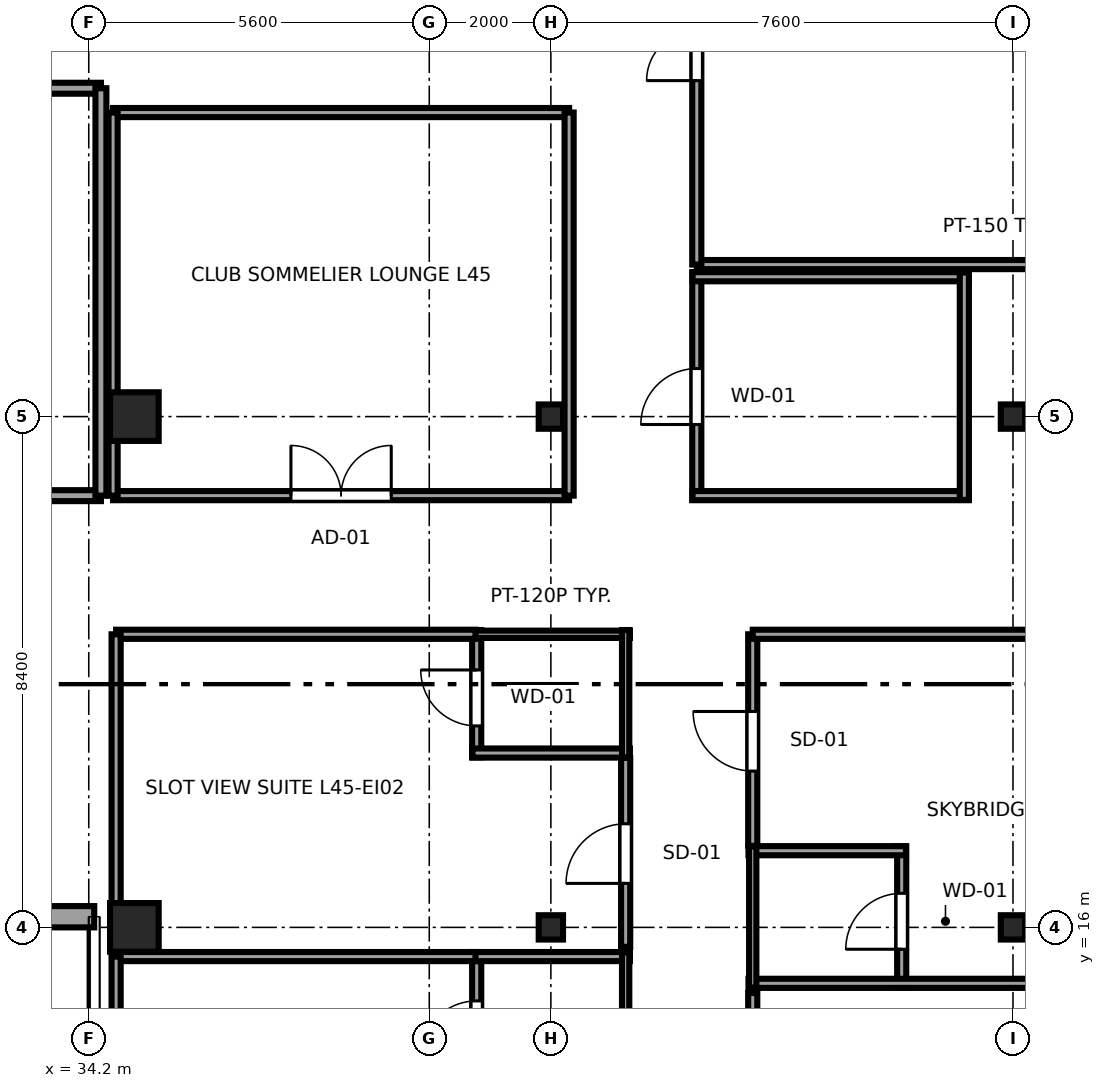
"""IFC4 building model, lengths in metres.
Left out: names, types, materials, properties, quantities, classifications, styles, units other than length and angle.
Written with IfcOpenShell. Run it as: python <this file> out.ifc"""

import sys

from ifc_helpers import new_model, si_unit, direction, frame, frame_2d, origin, origin_2d, place, context, subcontext, project, spatial, rectangle, i_section, extrude, source, transform, mapped, element, fill, save


model = new_model("IFC4")
c1 = context("Model", 3, precision=1e-05, world=origin(), true_north=direction((0.0, 1.0)))
c2 = subcontext(c1, "Body", "Model", "MODEL_VIEW")
j1 = project(units=[si_unit("LENGTHUNIT", "METRE"), si_unit("PLANEANGLEUNIT", "RADIAN")], contexts=[c1])
p1 = place(None, origin())
s1 = spatial("IfcSite", under=j1, at=p1, CompositionType="ELEMENT")
p2 = place(p1, origin())
s2 = spatial("IfcBuilding", under=s1, at=p2, CompositionType="ELEMENT")
p3 = place(p2, frame((0.0, 0.0, 171.9)))
s3 = spatial("IfcBuildingStorey", under=s2, at=p3, CompositionType="ELEMENT", Elevation=171.9)
m1 = source(origin(), c2, "Body", "SweptSolid", [
    extrude(rectangle(XDim=0.8, YDim=0.8, at=origin_2d()), origin(), (0.0, 0.0, 1.0), 3.55),
])
for number, where, z_axis, x_axis in (
    (1, (34.95, 16.0, 0.0), (0.0, 0.0, 1.0), (1.0, 0.0, 0.0)),
    (2, (34.95, 24.4, 0.0), (0.0, 0.0, 1.0), (1.0, 0.0, 0.0)),
):
    element("IfcColumn", number, at=place(p3, frame(where, z_axis=z_axis, x_axis=x_axis)), inside=s3, PredefinedType="COLUMN", context=c2, shape_type="MappedRepresentation", body=[
        mapped(m1, transform((0.0, 0.0, 0.0), x_axis=(1.0, 0.0, 0.0), y_axis=(0.0, 1.0, 0.0), z_axis=(0.0, 0.0, 1.0), scale=1.0)),
    ])
m2 = source(origin(), c2, "Body", "SweptSolid", [
    extrude(i_section(OverallWidth=0.4, OverallDepth=0.4, WebThickness=0.02, FlangeThickness=0.035, at=origin_2d()), origin(), (0.0, 0.0, 1.0), 3.55),
])
for number, where, z_axis, x_axis in (
    (3, (41.8, 16.0, 0.0), (0.0, 0.0, 1.0), (1.0, 0.0, 0.0)),
    (4, (41.8, 24.4, 0.0), (0.0, 0.0, 1.0), (1.0, 0.0, 0.0)),
    (5, (49.4, 16.0, 0.0), (0.0, 0.0, 1.0), (1.0, 0.0, 0.0)),
    (6, (49.4, 24.4, 0.0), (0.0, 0.0, 1.0), (1.0, 0.0, 0.0)),
):
    element("IfcColumn", number, at=place(p3, frame(where, z_axis=z_axis, x_axis=x_axis)), inside=s3, PredefinedType="COLUMN", context=c2, shape_type="MappedRepresentation", body=[
        mapped(m2, transform((0.0, 0.0, 0.0), x_axis=(1.0, 0.0, 0.0), y_axis=(0.0, 1.0, 0.0), z_axis=(0.0, 0.0, 1.0), scale=1.0)),
    ])
p4 = place(p3, frame((22.71, 16.175, 0.0), z_axis=(0.0, 0.0, 1.0), x_axis=(1.0, 0.0, 0.0)))
e7 = element("IfcWall", 7, at=p4, inside=s3, PredefinedType="SOLIDWALL", context=c2, shape_type="SweptSolid", body=[
    extrude(rectangle(XDim=11.58, YDim=0.35, at=frame_2d((5.79, 0.0))), origin(), (0.0, 0.0, 1.0), 2.758),
])
p5 = place(p4, frame((1.92, 0.0, 0.68)))
e8 = element("IfcOpeningElement", 8, at=p5, cuts=e7, PredefinedType="OPENING", context=c2, shape_type="SweptSolid", body=[
    extrude(rectangle(XDim=2.55, YDim=1.92, at=frame_2d((1.275, 0.96))), frame((0.0, 0.185, 0.0), z_axis=(0.0, -1.0, 0.0), x_axis=(1.0, 0.0, 0.0)), (0.0, 0.0, 1.0), 0.37),
])
p6 = place(p4, frame((7.11, 0.0, 0.68)))
e9 = element("IfcOpeningElement", 9, at=p6, cuts=e7, PredefinedType="OPENING", context=c2, shape_type="SweptSolid", body=[
    extrude(rectangle(XDim=2.55, YDim=1.92, at=frame_2d((1.275, 0.96))), frame((0.0, 0.185, 0.0), z_axis=(0.0, -1.0, 0.0), x_axis=(1.0, 0.0, 0.0)), (0.0, 0.0, 1.0), 0.37),
])
p7 = place(p3, frame((40.58, 13.212, 0.0), z_axis=(0.0, 0.0, 1.0), x_axis=(0.0, 1.0, 0.0)))
e10 = element("IfcWall", 10, at=p7, inside=s3, PredefinedType="PARTITIONING", context=c2, shape_type="SweptSolid", body=[
    extrude(rectangle(XDim=2.378, YDim=0.15, at=frame_2d((1.189, 0.0))), origin(), (0.0, 0.0, 1.0), 3.37),
])
p8 = place(p7, frame((0.659, 0.0, 0.0)))
e11 = element("IfcOpeningElement", 11, at=p8, cuts=e10, PredefinedType="OPENING", context=c2, shape_type="SweptSolid", body=[
    extrude(rectangle(XDim=0.92, YDim=2.01, at=frame_2d((0.46, 1.005))), frame((0.0, 0.085, 0.0), z_axis=(0.0, -1.0, 0.0), x_axis=(1.0, 0.0, 0.0)), (0.0, 0.0, 1.0), 0.17),
])
p9 = place(p3, frame((40.51, 15.52, 0.0), z_axis=(0.0, 0.0, 1.0), x_axis=(1.0, 0.0, 0.0)))
e12 = element("IfcWall", 12, at=p9, inside=s3, PredefinedType="PARTITIONING", context=c2, shape_type="SweptSolid", body=[
    extrude(rectangle(XDim=2.59, YDim=0.15, at=frame_2d((1.295, 0.0))), origin(), (0.0, 0.0, 1.0), 3.37),
])
p10 = place(p3, frame((43.03, 13.212, 0.0), z_axis=(0.0, 0.0, 1.0), x_axis=(0.0, 1.0, 0.0)))
e13 = element("IfcWall", 13, at=p10, inside=s3, PredefinedType="PLUMBINGWALL", context=c2, shape_type="SweptSolid", body=[
    extrude(rectangle(XDim=2.378, YDim=0.12, at=frame_2d((1.189, 0.0))), origin(), (0.0, 0.0, 1.0), 3.37),
])
p11 = place(p3, frame((40.58, 18.797, 0.0), z_axis=(0.0, 0.0, 1.0), x_axis=(0.0, 1.0, 0.0)))
e14 = element("IfcWall", 14, at=p11, inside=s3, PredefinedType="PARTITIONING", context=c2, shape_type="SweptSolid", body=[
    extrude(rectangle(XDim=2.093, YDim=0.15, at=frame_2d((1.046, 0.0))), origin(), (0.0, 0.0, 1.0), 3.37),
])
p12 = place(p11, frame((0.517, 0.0, 0.0)))
e15 = element("IfcOpeningElement", 15, at=p12, cuts=e14, PredefinedType="OPENING", context=c2, shape_type="SweptSolid", body=[
    extrude(rectangle(XDim=0.92, YDim=2.01, at=frame_2d((0.46, 1.005))), frame((0.0, 0.085, 0.0), z_axis=(0.0, -1.0, 0.0), x_axis=(1.0, 0.0, 0.0)), (0.0, 0.0, 1.0), 0.17),
])
p13 = place(p3, frame((40.51, 18.867, 0.0), z_axis=(0.0, 0.0, 1.0), x_axis=(1.0, 0.0, 0.0)))
e16 = element("IfcWall", 16, at=p13, inside=s3, PredefinedType="PARTITIONING", context=c2, shape_type="SweptSolid", body=[
    extrude(rectangle(XDim=2.59, YDim=0.15, at=frame_2d((1.295, 0.0))), origin(), (0.0, 0.0, 1.0), 3.37),
])
p14 = place(p3, frame((40.51, 20.82, 0.0), z_axis=(0.0, 0.0, 1.0), x_axis=(1.0, 0.0, 0.0)))
e17 = element("IfcWall", 17, at=p14, inside=s3, PredefinedType="PLUMBINGWALL", context=c2, shape_type="SweptSolid", body=[
    extrude(rectangle(XDim=2.59, YDim=0.12, at=frame_2d((1.295, 0.0))), origin(), (0.0, 0.0, 1.0), 3.37),
])
p15 = place(p3, frame((43.03, 18.797, 0.0), z_axis=(0.0, 0.0, 1.0), x_axis=(0.0, 1.0, 0.0)))
e18 = element("IfcWall", 18, at=p15, inside=s3, PredefinedType="PLUMBINGWALL", context=c2, shape_type="SweptSolid", body=[
    extrude(rectangle(XDim=2.093, YDim=0.12, at=frame_2d((1.046, 0.0))), origin(), (0.0, 0.0, 1.0), 3.37),
])
p16 = place(p3, frame((47.57, 15.01, 0.0), z_axis=(0.0, 0.0, 1.0), x_axis=(0.0, 1.0, 0.0)))
e19 = element("IfcWall", 19, at=p16, inside=s3, PredefinedType="PARTITIONING", context=c2, shape_type="SweptSolid", body=[
    extrude(rectangle(XDim=2.321, YDim=0.15, at=frame_2d((1.161, 0.0))), origin(), (0.0, 0.0, 1.0), 3.37),
])
p17 = place(p16, frame((0.631, 0.0, 0.0)))
e20 = element("IfcOpeningElement", 20, at=p17, cuts=e19, PredefinedType="OPENING", context=c2, shape_type="SweptSolid", body=[
    extrude(rectangle(XDim=0.92, YDim=2.01, at=frame_2d((0.46, 1.005))), frame((0.0, 0.085, 0.0), z_axis=(0.0, -1.0, 0.0), x_axis=(1.0, 0.0, 0.0)), (0.0, 0.0, 1.0), 0.17),
])
p18 = place(p3, frame((45.05, 15.08, 0.0), z_axis=(0.0, 0.0, 1.0), x_axis=(1.0, 0.0, 0.0)))
e21 = element("IfcWall", 21, at=p18, inside=s3, PredefinedType="PARTITIONING", context=c2, shape_type="SweptSolid", body=[
    extrude(rectangle(XDim=9.05, YDim=0.15, at=frame_2d((4.525, 0.0))), origin(), (0.0, 0.0, 1.0), 3.37),
])
p19 = place(p3, frame((45.05, 17.261, 0.0), z_axis=(0.0, 0.0, 1.0), x_axis=(1.0, 0.0, 0.0)))
e22 = element("IfcWall", 22, at=p19, inside=s3, PredefinedType="PARTITIONING", context=c2, shape_type="SweptSolid", body=[
    extrude(rectangle(XDim=2.59, YDim=0.15, at=frame_2d((1.295, 0.0))), origin(), (0.0, 0.0, 1.0), 3.37),
])
p20 = place(p3, frame((45.12, 15.01, 0.0), z_axis=(0.0, 0.0, 1.0), x_axis=(0.0, 1.0, 0.0)))
e23 = element("IfcWall", 23, at=p20, inside=s3, PredefinedType="PLUMBINGWALL", context=c2, shape_type="SweptSolid", body=[
    extrude(rectangle(XDim=2.321, YDim=0.12, at=frame_2d((1.161, 0.0))), origin(), (0.0, 0.0, 1.0), 3.37),
])
p21 = place(p3, frame((34.65, 15.52, 0.0), z_axis=(0.0, 0.0, 1.0), x_axis=(1.0, 0.0, 0.0)))
e24 = element("IfcWall", 24, at=p21, inside=s3, PredefinedType="PARTITIONING", context=c2, shape_type="SweptSolid", body=[
    extrude(rectangle(XDim=5.91, YDim=0.15, at=frame_2d((2.955, 0.0))), origin(), (0.0, 0.0, 1.0), 3.37),
])
p22 = place(p3, frame((34.65, 9.63, 0.0), z_axis=(0.0, 0.0, 1.0), x_axis=(0.0, 1.0, 0.0)))
e25 = element("IfcWall", 25, at=p22, inside=s3, PredefinedType="PARTITIONING", context=c2, shape_type="SweptSolid", body=[
    extrude(rectangle(XDim=5.89, YDim=0.15, at=frame_2d((2.945, 0.0))), origin(), (0.0, 0.0, 1.0), 3.37),
])
p23 = place(p3, frame((43.03, 15.68, 0.0), z_axis=(0.0, 0.0, 1.0), x_axis=(0.0, 1.0, 0.0)))
e26 = element("IfcWall", 26, at=p23, inside=s3, PredefinedType="PARTITIONING", context=c2, shape_type="SweptSolid", body=[
    extrude(rectangle(XDim=3.107, YDim=0.15, at=frame_2d((1.554, 0.0))), origin(), (0.0, 0.0, 1.0), 3.37),
])
p24 = place(p23, frame((1.043, 0.0, 0.0)))
e27 = element("IfcOpeningElement", 27, at=p24, cuts=e26, PredefinedType="OPENING", context=c2, shape_type="SweptSolid", body=[
    extrude(rectangle(XDim=0.98, YDim=2.12, at=frame_2d((0.49, 1.06))), frame((0.0, 0.085, 0.0), z_axis=(0.0, -1.0, 0.0), x_axis=(1.0, 0.0, 0.0)), (0.0, 0.0, 1.0), 0.17),
])
p25 = place(p3, frame((34.65, 20.82, 0.0), z_axis=(0.0, 0.0, 1.0), x_axis=(1.0, 0.0, 0.0)))
e28 = element("IfcWall", 28, at=p25, inside=s3, PredefinedType="PARTITIONING", context=c2, shape_type="SweptSolid", body=[
    extrude(rectangle(XDim=5.91, YDim=0.15, at=frame_2d((2.955, 0.0))), origin(), (0.0, 0.0, 1.0), 3.37),
])
p26 = place(p3, frame((34.65, 15.68, 0.0), z_axis=(0.0, 0.0, 1.0), x_axis=(0.0, 1.0, 0.0)))
e29 = element("IfcWall", 29, at=p26, inside=s3, PredefinedType="PARTITIONING", context=c2, shape_type="SweptSolid", body=[
    extrude(rectangle(XDim=5.14, YDim=0.15, at=frame_2d((2.57, 0.0))), origin(), (0.0, 0.0, 1.0), 3.37),
])
p27 = place(p3, frame((45.12, 11.379, 0.0), z_axis=(0.0, 0.0, 1.0), x_axis=(0.0, 1.0, 0.0)))
e30 = element("IfcWall", 30, at=p27, inside=s3, PredefinedType="PARTITIONING", context=c2, shape_type="SweptSolid", body=[
    extrude(rectangle(XDim=3.541, YDim=0.15, at=frame_2d((1.771, 0.0))), origin(), (0.0, 0.0, 1.0), 3.37),
])
p28 = place(p27, frame((1.26, 0.0, 0.0)))
e31 = element("IfcOpeningElement", 31, at=p28, cuts=e30, PredefinedType="OPENING", context=c2, shape_type="SweptSolid", body=[
    extrude(rectangle(XDim=0.98, YDim=2.12, at=frame_2d((0.49, 1.06))), frame((0.0, 0.085, 0.0), z_axis=(0.0, -1.0, 0.0), x_axis=(1.0, 0.0, 0.0)), (0.0, 0.0, 1.0), 0.17),
])
p29 = place(p3, frame((45.12, 17.341, 0.0), z_axis=(0.0, 0.0, 1.0), x_axis=(0.0, 1.0, 0.0)))
e32 = element("IfcWall", 32, at=p29, inside=s3, PredefinedType="PARTITIONING", context=c2, shape_type="SweptSolid", body=[
    extrude(rectangle(XDim=3.479, YDim=0.15, at=frame_2d((1.74, 0.0))), origin(), (0.0, 0.0, 1.0), 3.37),
])
p30 = place(p29, frame((1.229, 0.0, 0.0)))
e33 = element("IfcOpeningElement", 33, at=p30, cuts=e32, PredefinedType="OPENING", context=c2, shape_type="SweptSolid", body=[
    extrude(rectangle(XDim=0.98, YDim=2.12, at=frame_2d((0.49, 1.06))), frame((0.0, 0.085, 0.0), z_axis=(0.0, -1.0, 0.0), x_axis=(1.0, 0.0, 0.0)), (0.0, 0.0, 1.0), 0.17),
])
p31 = place(p3, frame((45.12, 20.82, 0.0), z_axis=(0.0, 0.0, 1.0), x_axis=(1.0, 0.0, 0.0)))
e34 = element("IfcWall", 34, at=p31, inside=s3, PredefinedType="PARTITIONING", context=c2, shape_type="SweptSolid", body=[
    extrude(rectangle(XDim=8.98, YDim=0.15, at=frame_2d((4.49, 0.0))), origin(), (0.0, 0.0, 1.0), 3.37),
])
p32 = place(p3, frame((44.2, 23.03, 0.0), z_axis=(0.0, 0.0, 1.0), x_axis=(0.0, 1.0, 0.0)))
e35 = element("IfcWall", 35, at=p32, inside=s3, PredefinedType="PARTITIONING", context=c2, shape_type="SweptSolid", body=[
    extrude(rectangle(XDim=3.74, YDim=0.15, at=frame_2d((1.87, 0.0))), origin(), (0.0, 0.0, 1.0), 3.37),
])
p33 = place(p32, frame((1.24, 0.0, 0.0)))
e36 = element("IfcOpeningElement", 36, at=p33, cuts=e35, PredefinedType="OPENING", context=c2, shape_type="SweptSolid", body=[
    extrude(rectangle(XDim=0.92, YDim=2.01, at=frame_2d((0.46, 1.005))), frame((0.0, 0.085, 0.0), z_axis=(0.0, -1.0, 0.0), x_axis=(1.0, 0.0, 0.0)), (0.0, 0.0, 1.0), 0.17),
])
for number, where, z_axis, x_axis in (
    (37, (44.13, 23.1, 0.0), (0.0, 0.0, 1.0), (1.0, 0.0, 0.0)),
    (38, (44.13, 26.7, 0.0), (0.0, 0.0, 1.0), (1.0, 0.0, 0.0)),
):
    element("IfcWall", number, at=place(p3, frame(where, z_axis=z_axis, x_axis=x_axis)), inside=s3, PredefinedType="PARTITIONING", context=c2, shape_type="SweptSolid", body=[
        extrude(rectangle(XDim=4.54, YDim=0.15, at=frame_2d((2.27, 0.0))), origin(), (0.0, 0.0, 1.0), 3.37),
    ])
p34 = place(p3, frame((48.6, 23.03, 0.0), z_axis=(0.0, 0.0, 1.0), x_axis=(0.0, 1.0, 0.0)))
e39 = element("IfcWall", 39, at=p34, inside=s3, PredefinedType="PARTITIONING", context=c2, shape_type="SweptSolid", body=[
    extrude(rectangle(XDim=3.74, YDim=0.15, at=frame_2d((1.87, 0.0))), origin(), (0.0, 0.0, 1.0), 3.37),
])
p35 = place(p3, frame((44.2, 26.9, 0.0), z_axis=(0.0, 0.0, 1.0), x_axis=(1.0, 0.0, 0.0)))
e40 = element("IfcWall", 40, at=p35, inside=s3, PredefinedType="PARTITIONING", context=c2, shape_type="SweptSolid", body=[
    extrude(rectangle(XDim=9.9, YDim=0.15, at=frame_2d((4.95, 0.0))), origin(), (0.0, 0.0, 1.0), 3.37),
])
p36 = place(p3, frame((44.2, 26.9, 0.0), z_axis=(0.0, 0.0, 1.0), x_axis=(0.0, 1.0, 0.0)))
e41 = element("IfcWall", 41, at=p36, inside=s3, PredefinedType="PARTITIONING", context=c2, shape_type="SweptSolid", body=[
    extrude(rectangle(XDim=7.7, YDim=0.15, at=frame_2d((3.85, 0.0))), origin(), (0.0, 0.0, 1.0), 3.37),
])
p37 = place(p36, frame((3.025, 0.0, 0.0)))
e42 = element("IfcOpeningElement", 42, at=p37, cuts=e41, PredefinedType="OPENING", context=c2, shape_type="SweptSolid", body=[
    extrude(rectangle(XDim=1.65, YDim=2.15, at=frame_2d((0.825, 1.075))), frame((0.0, 0.085, 0.0), z_axis=(0.0, -1.0, 0.0), x_axis=(1.0, 0.0, 0.0)), (0.0, 0.0, 1.0), 0.17),
])
p38 = place(p3, frame((27.1, 23.1, 0.0), z_axis=(0.0, 0.0, 1.0), x_axis=(1.0, 0.0, 0.0)))
e43 = element("IfcWall", 43, at=p38, inside=s3, PredefinedType="PARTITIONING", context=c2, shape_type="SweptSolid", body=[
    extrude(rectangle(XDim=7.3, YDim=0.18, at=frame_2d((3.65, 0.0))), origin(), (0.0, 0.0, 1.0), 3.37),
])
p39 = place(p38, frame((2.825, 0.0, 0.0)))
e44 = element("IfcOpeningElement", 44, at=p39, cuts=e43, PredefinedType="OPENING", context=c2, shape_type="SweptSolid", body=[
    extrude(rectangle(XDim=1.65, YDim=2.15, at=frame_2d((0.825, 1.075))), frame((0.0, 0.1, 0.0), z_axis=(0.0, -1.0, 0.0), x_axis=(1.0, 0.0, 0.0)), (0.0, 0.0, 1.0), 0.2),
])
p40 = place(p3, frame((27.1, 29.8, 0.0), z_axis=(0.0, 0.0, 1.0), x_axis=(1.0, 0.0, 0.0)))
e45 = element("IfcWall", 45, at=p40, inside=s3, PredefinedType="PARTITIONING", context=c2, shape_type="SweptSolid", body=[
    extrude(rectangle(XDim=7.3, YDim=0.18, at=frame_2d((3.65, 0.0))), origin(), (0.0, 0.0, 1.0), 3.37),
])
p41 = place(p3, frame((34.4, 23.1, 0.0), z_axis=(0.0, 0.0, 1.0), x_axis=(0.0, 1.0, 0.0)))
e46 = element("IfcWall", 46, at=p41, inside=s3, PredefinedType="PARTITIONING", context=c2, shape_type="SweptSolid", body=[
    extrude(rectangle(XDim=6.7, YDim=0.18, at=frame_2d((3.35, 0.0))), origin(), (0.0, 0.0, 1.0), 3.37),
])
p42 = place(p3, frame((34.6, 23.1, 0.0), z_axis=(0.0, 0.0, 1.0), x_axis=(1.0, 0.0, 0.0)))
e47 = element("IfcWall", 47, at=p42, inside=s3, PredefinedType="PARTITIONING", context=c2, shape_type="SweptSolid", body=[
    extrude(rectangle(XDim=7.5, YDim=0.15, at=frame_2d((3.75, 0.0))), origin(), (0.0, 0.0, 1.0), 3.37),
])
p43 = place(p42, frame((2.925, 0.0, 0.0)))
e48 = element("IfcOpeningElement", 48, at=p43, cuts=e47, PredefinedType="OPENING", context=c2, shape_type="SweptSolid", body=[
    extrude(rectangle(XDim=1.65, YDim=2.15, at=frame_2d((0.825, 1.075))), frame((0.0, 0.085, 0.0), z_axis=(0.0, -1.0, 0.0), x_axis=(1.0, 0.0, 0.0)), (0.0, 0.0, 1.0), 0.17),
])
p44 = place(p3, frame((34.6, 29.4, 0.0), z_axis=(0.0, 0.0, 1.0), x_axis=(1.0, 0.0, 0.0)))
e49 = element("IfcWall", 49, at=p44, inside=s3, PredefinedType="PARTITIONING", context=c2, shape_type="SweptSolid", body=[
    extrude(rectangle(XDim=7.5, YDim=0.15, at=frame_2d((3.75, 0.0))), origin(), (0.0, 0.0, 1.0), 3.37),
])
p45 = place(p3, frame((34.6, 23.1, 0.0), z_axis=(0.0, 0.0, 1.0), x_axis=(0.0, 1.0, 0.0)))
e50 = element("IfcWall", 50, at=p45, inside=s3, PredefinedType="PARTITIONING", context=c2, shape_type="SweptSolid", body=[
    extrude(rectangle(XDim=6.3, YDim=0.15, at=frame_2d((3.15, 0.0))), origin(), (0.0, 0.0, 1.0), 3.37),
])
p46 = place(p3, frame((42.1, 23.1, 0.0), z_axis=(0.0, 0.0, 1.0), x_axis=(0.0, 1.0, 0.0)))
e51 = element("IfcWall", 51, at=p46, inside=s3, PredefinedType="PARTITIONING", context=c2, shape_type="SweptSolid", body=[
    extrude(rectangle(XDim=6.3, YDim=0.15, at=frame_2d((3.15, 0.0))), origin(), (0.0, 0.0, 1.0), 2.16),
])
m3 = source(origin(), c2, "Body", "SweptSolid", [
    extrude(rectangle(XDim=0.92, YDim=2.01, at=frame_2d((0.46, 1.005))), frame((0.0, 0.025, 0.0), z_axis=(0.0, -1.0, 0.0), x_axis=(1.0, 0.0, 0.0)), (0.0, 0.0, 1.0), 0.05),
])
p47 = place(p8, origin())
e52 = element("IfcDoor", 52, at=p47, inside=s3, OperationType="SINGLE_SWING_LEFT", PredefinedType="DOOR", context=c2, shape_type="MappedRepresentation", body=[
    mapped(m3, transform((0.0, 0.0, 0.0), x_axis=(1.0, 0.0, 0.0), y_axis=(0.0, 1.0, 0.0), z_axis=(0.0, 0.0, 1.0), scale=1.0)),
])
fill(e11, e52)
p48 = place(p12, origin())
e53 = element("IfcDoor", 53, at=p48, inside=s3, OperationType="SINGLE_SWING_RIGHT", PredefinedType="DOOR", context=c2, shape_type="MappedRepresentation", body=[
    mapped(m3, transform((0.0, 0.0, 0.0), x_axis=(1.0, 0.0, 0.0), y_axis=(0.0, 1.0, 0.0), z_axis=(0.0, 0.0, 1.0), scale=1.0)),
])
fill(e15, e53)
p49 = place(p17, origin())
e54 = element("IfcDoor", 54, at=p49, inside=s3, OperationType="SINGLE_SWING_LEFT", PredefinedType="DOOR", context=c2, shape_type="MappedRepresentation", body=[
    mapped(m3, transform((0.0, 0.0, 0.0), x_axis=(1.0, 0.0, 0.0), y_axis=(0.0, 1.0, 0.0), z_axis=(0.0, 0.0, 1.0), scale=1.0)),
])
fill(e20, e54)
m4 = source(origin(), c2, "Body", "SweptSolid", [
    extrude(rectangle(XDim=0.98, YDim=2.12, at=frame_2d((0.49, 1.06))), frame((0.0, 0.025, 0.0), z_axis=(0.0, -1.0, 0.0), x_axis=(1.0, 0.0, 0.0)), (0.0, 0.0, 1.0), 0.05),
])
p50 = place(p24, origin())
e55 = element("IfcDoor", 55, at=p50, inside=s3, OperationType="SINGLE_SWING_LEFT", PredefinedType="DOOR", context=c2, shape_type="MappedRepresentation", body=[
    mapped(m4, transform((0.0, 0.0, 0.0), x_axis=(1.0, 0.0, 0.0), y_axis=(0.0, 1.0, 0.0), z_axis=(0.0, 0.0, 1.0), scale=1.0)),
])
fill(e27, e55)
p51 = place(p30, origin())
e56 = element("IfcDoor", 56, at=p51, inside=s3, OperationType="SINGLE_SWING_RIGHT", PredefinedType="DOOR", context=c2, shape_type="MappedRepresentation", body=[
    mapped(m4, transform((0.0, 0.0, 0.0), x_axis=(1.0, 0.0, 0.0), y_axis=(0.0, 1.0, 0.0), z_axis=(0.0, 0.0, 1.0), scale=1.0)),
])
fill(e33, e56)
p52 = place(p33, origin())
e57 = element("IfcDoor", 57, at=p52, inside=s3, OperationType="SINGLE_SWING_LEFT", PredefinedType="DOOR", context=c2, shape_type="MappedRepresentation", body=[
    mapped(m3, transform((0.0, 0.0, 0.0), x_axis=(1.0, 0.0, 0.0), y_axis=(0.0, 1.0, 0.0), z_axis=(0.0, 0.0, 1.0), scale=1.0)),
])
fill(e36, e57)
m5 = source(origin(), c2, "Body", "SweptSolid", [
    extrude(rectangle(XDim=1.65, YDim=2.15, at=frame_2d((0.825, 1.075))), frame((0.0, 0.025, 0.0), z_axis=(0.0, -1.0, 0.0), x_axis=(1.0, 0.0, 0.0)), (0.0, 0.0, 1.0), 0.05),
])
p53 = place(p37, origin())
e58 = element("IfcDoor", 58, at=p53, inside=s3, OperationType="DOUBLE_DOOR_SINGLE_SWING", PredefinedType="DOOR", context=c2, shape_type="MappedRepresentation", body=[
    mapped(m5, transform((0.0, 0.0, 0.0), x_axis=(1.0, 0.0, 0.0), y_axis=(0.0, 1.0, 0.0), z_axis=(0.0, 0.0, 1.0), scale=1.0)),
])
fill(e42, e58)
p54 = place(p43, origin())
e59 = element("IfcDoor", 59, at=p54, inside=s3, OperationType="DOUBLE_DOOR_SINGLE_SWING", PredefinedType="DOOR", context=c2, shape_type="MappedRepresentation", body=[
    mapped(m5, transform((0.0, 0.0, 0.0), x_axis=(1.0, 0.0, 0.0), y_axis=(0.0, 1.0, 0.0), z_axis=(0.0, 0.0, 1.0), scale=1.0)),
])
fill(e48, e59)
save(model, sys.argv[1])
